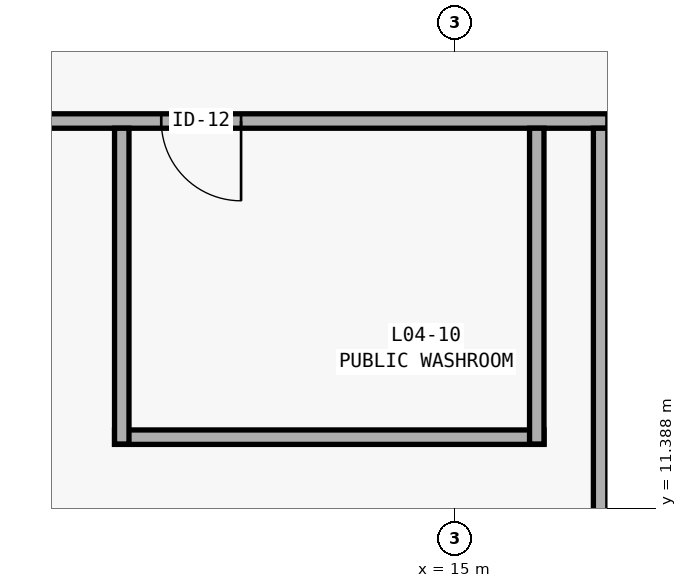
"""IFC4 building model, lengths in metres.
Left out: names, types, materials, properties, quantities, classifications, styles, units other than length and angle.
Written with IfcOpenShell. Run it as: python <this file> out.ifc"""

import sys

from ifc_helpers import new_model, si_unit, direction, frame, frame_2d, origin, place, context, subcontext, project, spatial, rectangle, extrude, element, fill, save


model = new_model("IFC4")
c1 = context("Model", 3, precision=1e-05, world=origin(), true_north=direction((0.0, 1.0)))
c2 = subcontext(c1, "Body", "Model", "MODEL_VIEW")
j1 = project(units=[si_unit("LENGTHUNIT", "METRE"), si_unit("PLANEANGLEUNIT", "RADIAN")], contexts=[c1])
p1 = place(None, origin())
s1 = spatial("IfcSite", under=j1, at=p1, CompositionType="ELEMENT")
p2 = place(p1, origin())
s2 = spatial("IfcBuilding", under=s1, at=p2, CompositionType="ELEMENT")
p3 = place(p2, frame((0.0, 0.0, 21.3)))
s3 = spatial("IfcBuildingStorey", under=s2, at=p3, CompositionType="ELEMENT", Elevation=21.3)
p4 = place(p3, frame((10.525, 12.32, 0.0), z_axis=(0.0, 0.0, 1.0), x_axis=(1.0, 0.0, 0.0)))
e1 = element("IfcWall", 1, at=p4, inside=s3, PredefinedType="PARTITIONING", context=c2, shape_type="SweptSolid", body=[
    extrude(rectangle(XDim=5.65, YDim=0.19, at=frame_2d((2.825, 0.0))), origin(), (0.0, 0.0, 1.0), 2.83),
])
p5 = place(p3, frame((0.295, 16.48, 0.0), z_axis=(0.0, 0.0, 1.0), x_axis=(1.0, 0.0, 0.0)))
e2 = element("IfcWall", 2, at=p5, inside=s3, PredefinedType="PARTITIONING", context=c2, shape_type="SweptSolid", body=[
    extrude(rectangle(XDim=16.72, YDim=0.19, at=frame_2d((8.36, 0.0))), origin(), (0.0, 0.0, 1.0), 2.83),
])
p6 = place(p5, frame((10.844, 0.0, 0.0)))
e3 = element("IfcOpeningElement", 3, at=p6, cuts=e2, PredefinedType="OPENING", context=c2, shape_type="SweptSolid", body=[
    extrude(rectangle(XDim=1.05, YDim=2.1, at=frame_2d((0.525, 1.05))), frame((0.0, 0.11, 0.0), z_axis=(0.0, -1.0, 0.0), x_axis=(1.0, 0.0, 0.0)), (0.0, 0.0, 1.0), 0.22),
])
p7 = place(p5, frame((7.435, 0.0, 0.0)))
e4 = element("IfcOpeningElement", 4, at=p7, cuts=e2, PredefinedType="OPENING", context=c2, shape_type="SweptSolid", body=[
    extrude(rectangle(XDim=1.85, YDim=2.35, at=frame_2d((0.925, 1.175))), frame((0.0, 0.11, 0.0), z_axis=(0.0, -1.0, 0.0), x_axis=(1.0, 0.0, 0.0)), (0.0, 0.0, 1.0), 0.22),
])
for number, where, z_axis, x_axis in (
    (5, (10.62, 12.23, 0.0), (0.0, 0.0, 1.0), (0.0, 1.0, 0.0)),
    (6, (16.08, 12.23, 0.0), (0.0, 0.0, 1.0), (0.0, 1.0, 0.0)),
):
    element("IfcWall", number, at=place(p3, frame(where, z_axis=z_axis, x_axis=x_axis)), inside=s3, PredefinedType="PARTITIONING", context=c2, shape_type="SweptSolid", body=[
        extrude(rectangle(XDim=4.155, YDim=0.19, at=frame_2d((2.078, 0.0))), origin(), (0.0, 0.0, 1.0), 2.83),
    ])
p8 = place(p3, frame((16.92, 3.115, 0.0), z_axis=(0.0, 0.0, 1.0), x_axis=(0.0, 1.0, 0.0)))
e7 = element("IfcWall", 7, at=p8, inside=s3, PredefinedType="PARTITIONING", context=c2, shape_type="SweptSolid", body=[
    extrude(rectangle(XDim=13.27, YDim=0.19, at=frame_2d((6.635, 0.0))), origin(), (0.0, 0.0, 1.0), 2.83),
])
p9 = place(p6, frame((1.05, 0.0, 0.0), z_axis=(0.0, 0.0, 1.0), x_axis=(-1.0, 0.0, 0.0)))
e8 = element("IfcDoor", 8, at=p9, inside=s3, OperationType="SINGLE_SWING_RIGHT", PredefinedType="DOOR", context=c2, shape_type="SweptSolid", body=[
    extrude(rectangle(XDim=1.05, YDim=2.1, at=frame_2d((0.525, 1.05))), frame((0.0, 0.025, 0.0), z_axis=(0.0, -1.0, 0.0), x_axis=(1.0, 0.0, 0.0)), (0.0, 0.0, 1.0), 0.05),
])
fill(e3, e8)
save(model, sys.argv[1])
